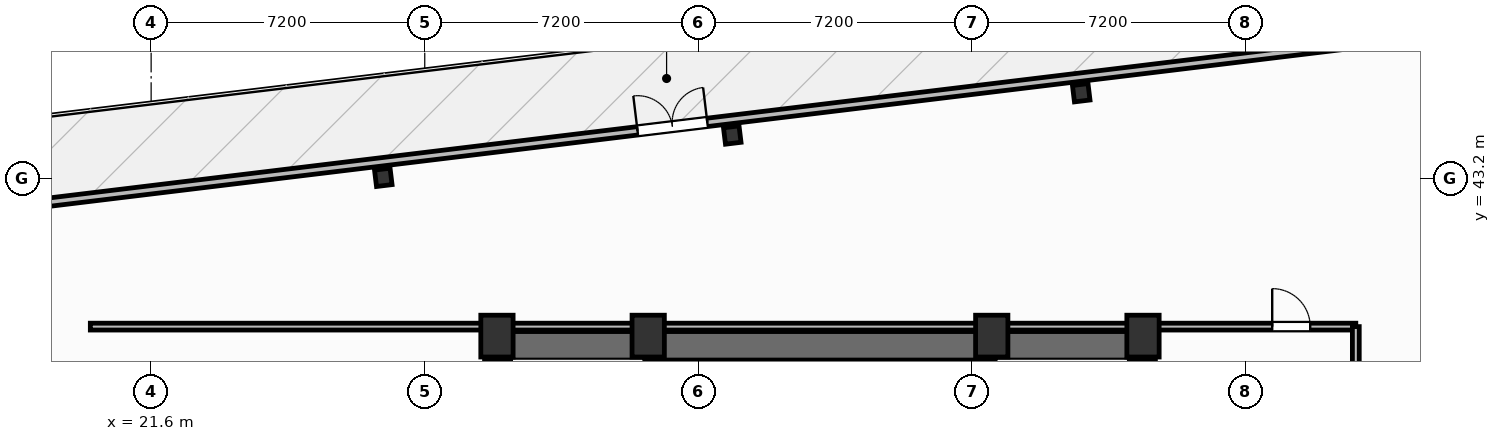
"""IFC4 building model, lengths in metres.
Left out: names, types, materials, properties, quantities, classifications, styles, units other than length and angle.
Written with IfcOpenShell. Run it as: python <this file> out.ifc"""

import sys

from ifc_helpers import new_model, si_unit, direction, frame, frame_2d, origin, origin_2d, place, context, subcontext, project, spatial, rectangle, i_section, extrude, element, fill, save


model = new_model("IFC4")
c1 = context("Model", 3, precision=1e-05, world=origin(), true_north=direction((0.0, 1.0)))
c2 = subcontext(c1, "Body", "Model", "MODEL_VIEW")
j1 = project(units=[si_unit("LENGTHUNIT", "METRE"), si_unit("PLANEANGLEUNIT", "RADIAN")], contexts=[c1])
p1 = place(None, origin())
s1 = spatial("IfcSite", under=j1, at=p1, CompositionType="ELEMENT")
p2 = place(p1, origin())
s2 = spatial("IfcBuilding", under=s1, at=p2, CompositionType="ELEMENT")
p3 = place(p2, frame((0.0, 0.0, 162.4)))
s3 = spatial("IfcBuildingStorey", under=s2, at=p3, CompositionType="ELEMENT", Elevation=162.4)
for number, where, z_axis, x_axis in (
    (1, (30.7, 39.05, 0.0), (0.0, 0.0, 1.0), (1.0, 0.0, 0.0)),
    (2, (34.68, 39.05, 0.0), (0.0, 0.0, 1.0), (1.0, 0.0, 0.0)),
    (3, (43.72, 39.05, 0.0), (0.0, 0.0, 1.0), (1.0, 0.0, 0.0)),
    (4, (47.7, 39.05, 0.0), (0.0, 0.0, 1.0), (1.0, 0.0, 0.0)),
):
    element("IfcColumn", number, at=place(p3, frame(where, z_axis=z_axis, x_axis=x_axis)), inside=s3, PredefinedType="COLUMN", context=c2, shape_type="SweptSolid", body=[
        extrude(rectangle(XDim=0.85, YDim=1.1, at=origin_2d()), origin(), (0.0, 0.0, 1.0), 4.8),
    ])
p4 = place(p3, frame((30.38, 38.795, 0.0), z_axis=(0.0, 0.0, 1.0), x_axis=(1.0, 0.0, 0.0)))
e5 = element("IfcWall", 5, at=p4, inside=s3, PredefinedType="SHEAR", context=c2, shape_type="SweptSolid", body=[
    extrude(rectangle(XDim=17.64, YDim=0.75, at=frame_2d((8.82, 0.0))), origin(), (0.0, 0.0, 1.0), 4.55),
])
p5 = place(p3, frame((30.755, 29.2, 0.0), z_axis=(0.0, 0.0, 1.0), x_axis=(0.0, 1.0, 0.0)))
e6 = element("IfcWall", 6, at=p5, inside=s3, PredefinedType="SHEAR", context=c2, shape_type="SweptSolid", body=[
    extrude(rectangle(XDim=9.22, YDim=0.75, at=frame_2d((4.61, 0.0))), origin(), (0.0, 0.0, 1.0), 4.55),
])
p6 = place(p5, frame((0.65, 0.0, 0.0)))
e7 = element("IfcOpeningElement", 7, at=p6, cuts=e6, PredefinedType="OPENING", context=c2, shape_type="SweptSolid", body=[
    extrude(rectangle(XDim=1.1, YDim=2.15, at=frame_2d((0.55, 1.075))), frame((0.0, 0.385, 0.0), z_axis=(0.0, -1.0, 0.0), x_axis=(1.0, 0.0, 0.0)), (0.0, 0.0, 1.0), 0.77),
])
p7 = place(p3, frame((47.645, 29.2, 0.0), z_axis=(0.0, 0.0, 1.0), x_axis=(0.0, 1.0, 0.0)))
e8 = element("IfcWall", 8, at=p7, inside=s3, PredefinedType="SHEAR", context=c2, shape_type="SweptSolid", body=[
    extrude(rectangle(XDim=9.22, YDim=0.75, at=frame_2d((4.61, 0.0))), origin(), (0.0, 0.0, 1.0), 4.55),
])
p8 = place(p3, frame((34.64, 29.2, 0.0), z_axis=(0.0, 0.0, 1.0), x_axis=(0.0, 1.0, 0.0)))
e9 = element("IfcWall", 9, at=p8, inside=s3, PredefinedType="SHEAR", context=c2, shape_type="SweptSolid", body=[
    extrude(rectangle(XDim=9.22, YDim=0.25, at=frame_2d((4.61, 0.0))), origin(), (0.0, 0.0, 1.0), 4.55),
])
p9 = place(p8, frame((0.65, 0.0, 0.0)))
e10 = element("IfcOpeningElement", 10, at=p9, cuts=e9, PredefinedType="OPENING", context=c2, shape_type="SweptSolid", body=[
    extrude(rectangle(XDim=1.05, YDim=2.15, at=frame_2d((0.525, 1.075))), frame((0.0, 0.135, 0.0), z_axis=(0.0, -1.0, 0.0), x_axis=(1.0, 0.0, 0.0)), (0.0, 0.0, 1.0), 0.27),
])
p10 = place(p3, frame((43.76, 29.2, 0.0), z_axis=(0.0, 0.0, 1.0), x_axis=(0.0, 1.0, 0.0)))
e11 = element("IfcWall", 11, at=p10, inside=s3, PredefinedType="SHEAR", context=c2, shape_type="SweptSolid", body=[
    extrude(rectangle(XDim=9.22, YDim=0.25, at=frame_2d((4.61, 0.0))), origin(), (0.0, 0.0, 1.0), 4.55),
])
p11 = place(p10, frame((0.65, 0.0, 0.0)))
e12 = element("IfcOpeningElement", 12, at=p11, cuts=e11, PredefinedType="OPENING", context=c2, shape_type="SweptSolid", body=[
    extrude(rectangle(XDim=1.05, YDim=2.15, at=frame_2d((0.525, 1.075))), frame((0.0, 0.135, 0.0), z_axis=(0.0, -1.0, 0.0), x_axis=(1.0, 0.0, 0.0)), (0.0, 0.0, 1.0), 0.27),
])
for number, where, z_axis, x_axis in (
    (13, (46.075, 45.454, -0.32), (0.0, 0.0, 1.0), (0.993, 0.12, 0.0)),
    (14, (36.892, 44.341, -0.32), (0.0, 0.0, 1.0), (0.993, 0.12, 0.0)),
    (15, (27.709, 43.227, -0.32), (0.0, 0.0, 1.0), (0.993, 0.12, 0.0)),
):
    element("IfcColumn", number, at=place(p3, frame(where, z_axis=z_axis, x_axis=x_axis)), inside=s3, PredefinedType="COLUMN", context=c2, shape_type="SweptSolid", body=[
        extrude(i_section(OverallWidth=0.412, OverallDepth=0.435, WebThickness=0.036, FlangeThickness=0.057, FilletRadius=0.025, at=origin_2d()), origin(), (0.0, 0.0, 1.0), 5.12),
    ])
p12 = place(p3, frame((8.947, 41.366, 0.0), z_axis=(0.0, 0.0, 1.0), x_axis=(0.99273203641, 0.120345768043, 0.0)))
e16 = element("IfcWall", 16, at=p12, inside=s3, PredefinedType="SOLIDWALL", context=c2, shape_type="SweptSolid", body=[
    extrude(rectangle(XDim=56.2, YDim=0.22, at=frame_2d((28.1, 0.0))), origin(), (0.0, 0.0, 1.0), 3.83),
])
p13 = place(p12, frame((25.639, 0.0, 0.0)))
e17 = element("IfcOpeningElement", 17, at=p13, cuts=e16, PredefinedType="OPENING", context=c2, shape_type="SweptSolid", body=[
    extrude(rectangle(XDim=1.85, YDim=2.3, at=frame_2d((0.925, 1.15))), frame((0.0, 0.12, 0.0), z_axis=(0.0, -1.0, 0.0), x_axis=(1.0, 0.0, 0.0)), (0.0, 0.0, 1.0), 0.24),
])
p14 = place(p12, frame((0.55, 0.0, 0.75)))
e18 = element("IfcOpeningElement", 18, at=p14, cuts=e16, PredefinedType="OPENING", context=c2, shape_type="SweptSolid", body=[
    extrude(rectangle(XDim=1.65, YDim=1.65, at=frame_2d((0.825, 0.825))), frame((0.0, 0.12, 0.0), z_axis=(0.0, -1.0, 0.0), x_axis=(1.0, 0.0, 0.0)), (0.0, 0.0, 1.0), 0.24),
])
p15 = place(p12, frame((54.0, 0.0, 0.75)))
e19 = element("IfcOpeningElement", 19, at=p15, cuts=e16, PredefinedType="OPENING", context=c2, shape_type="SweptSolid", body=[
    extrude(rectangle(XDim=1.65, YDim=1.65, at=frame_2d((0.825, 0.825))), frame((0.0, 0.12, 0.0), z_axis=(0.0, -1.0, 0.0), x_axis=(1.0, 0.0, 0.0)), (0.0, 0.0, 1.0), 0.24),
])
p16 = place(p3, frame((20.0, 39.3, 0.0), z_axis=(0.0, 0.0, 1.0), x_axis=(1.0, 0.0, 0.0)))
e20 = element("IfcWall", 20, at=p16, inside=s3, PredefinedType="PARTITIONING", context=c2, shape_type="SweptSolid", body=[
    extrude(rectangle(XDim=33.3, YDim=0.18, at=frame_2d((16.65, 0.0))), origin(), (0.0, 0.0, 1.0), 3.762),
])
p17 = place(p16, frame((31.1, 0.0, 0.0)))
e21 = element("IfcOpeningElement", 21, at=p17, cuts=e20, PredefinedType="OPENING", context=c2, shape_type="SweptSolid", body=[
    extrude(rectangle(XDim=1.0, YDim=2.05, at=frame_2d((0.5, 1.025))), frame((0.0, 0.1, 0.0), z_axis=(0.0, -1.0, 0.0), x_axis=(1.0, 0.0, 0.0)), (0.0, 0.0, 1.0), 0.2),
])
p18 = place(p3, frame((53.3, 29.02, 0.0), z_axis=(0.0, 0.0, 1.0), x_axis=(0.0, 1.0, 0.0)))
e22 = element("IfcWall", 22, at=p18, inside=s3, PredefinedType="PARTITIONING", context=c2, shape_type="SweptSolid", body=[
    extrude(rectangle(XDim=10.28, YDim=0.18, at=frame_2d((5.14, 0.0))), origin(), (0.0, 0.0, 1.0), 4.55),
])
p19 = place(p13, origin())
e23 = element("IfcDoor", 23, at=p19, inside=s3, OperationType="DOUBLE_DOOR_SINGLE_SWING", PredefinedType="DOOR", context=c2, shape_type="SweptSolid", body=[
    extrude(rectangle(XDim=1.85, YDim=2.3, at=frame_2d((0.925, 1.15))), frame((0.0, 0.025, 0.0), z_axis=(0.0, -1.0, 0.0), x_axis=(1.0, 0.0, 0.0)), (0.0, 0.0, 1.0), 0.05),
])
fill(e17, e23)
p20 = place(p17, origin())
e24 = element("IfcDoor", 24, at=p20, inside=s3, OperationType="SINGLE_SWING_LEFT", PredefinedType="DOOR", context=c2, shape_type="SweptSolid", body=[
    extrude(rectangle(XDim=1.0, YDim=2.05, at=frame_2d((0.5, 1.025))), frame((0.0, 0.025, 0.0), z_axis=(0.0, -1.0, 0.0), x_axis=(1.0, 0.0, 0.0)), (0.0, 0.0, 1.0), 0.05),
])
fill(e21, e24)
save(model, sys.argv[1])
